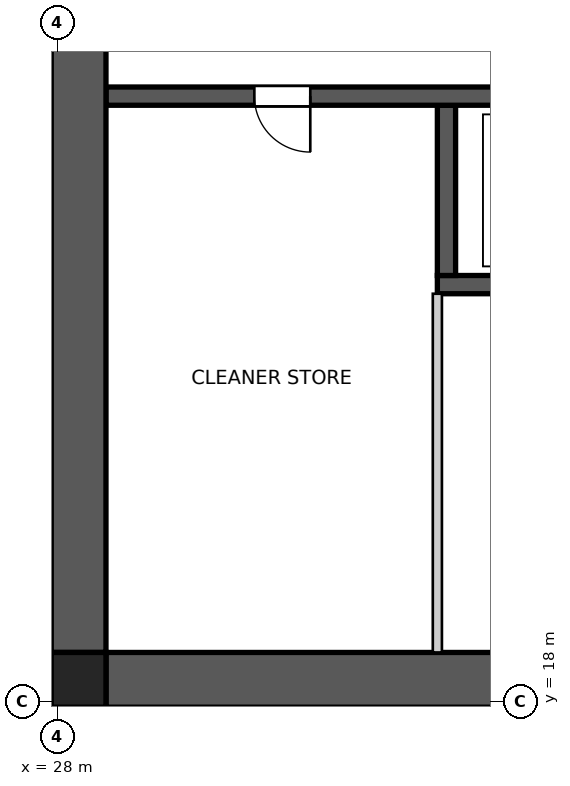
"""IFC4 building model, lengths in metres.
Left out: names, types, materials, properties, quantities, classifications, styles, units other than length and angle.
Written with IfcOpenShell. Run it as: python <this file> out.ifc"""

import sys

from ifc_helpers import new_model, si_unit, direction, frame, frame_2d, origin, origin_2d, place, context, subcontext, project, spatial, polyline, rectangle, outline, extrude, element, fill, save


model = new_model("IFC4")
c1 = context("Model", 3, precision=1e-05, world=origin(), true_north=direction((0.0, 1.0)))
c2 = subcontext(c1, "Body", "Model", "MODEL_VIEW")
j1 = project(units=[si_unit("LENGTHUNIT", "METRE"), si_unit("PLANEANGLEUNIT", "RADIAN")], contexts=[c1])
p1 = place(None, origin())
s1 = spatial("IfcSite", under=j1, at=p1, CompositionType="ELEMENT")
p2 = place(p1, origin())
s2 = spatial("IfcBuilding", under=s1, at=p2, CompositionType="ELEMENT")
p3 = place(p2, frame((0.0, 0.0, 47.2)))
s3 = spatial("IfcBuildingStorey", under=s2, at=p3, CompositionType="ELEMENT", Elevation=47.2)
p4 = place(p3, frame((51.2, 18.35, 0.0), z_axis=(0.0, 0.0, 1.0), x_axis=(-1.0, 0.0, 0.0)))
e1 = element("IfcWall", 1, at=p4, inside=s3, PredefinedType="SHEAR", context=c2, shape_type="SweptSolid", body=[
    extrude(outline(polyline([(0.0, -0.45), (22.4, -0.45), (22.4, -0.025), (22.85, -0.025), (22.85, 0.025), (22.4, 0.025), (22.4, 0.45), (0.0, 0.45), (0.0, 0.025), (-0.45, 0.025), (-0.45, -0.025), (0.0, -0.025), (0.0, -0.45)])), origin(), (0.0, 0.0, 1.0), 3.4),
])
p5 = place(p3, frame((28.35, 41.2, 0.0), z_axis=(0.0, 0.0, 1.0), x_axis=(0.0, -1.0, 0.0)))
e2 = element("IfcWall", 2, at=p5, inside=s3, PredefinedType="SHEAR", context=c2, shape_type="SweptSolid", body=[
    extrude(outline(polyline([(0.0, -0.45), (22.4, -0.45), (22.4, -0.025), (22.85, -0.025), (22.85, 0.025), (22.4, 0.025), (22.4, 0.45), (0.0, 0.45), (0.0, 0.025), (-0.45, 0.025), (-0.45, -0.025), (0.0, -0.025), (0.0, -0.45)])), origin(), (0.0, 0.0, 1.0), 3.4),
])
p6 = place(p5, frame((11.14, 0.0, 0.0)))
e3 = element("IfcOpeningElement", 3, at=p6, cuts=e2, PredefinedType="OPENING", context=c2, shape_type="SweptSolid", body=[
    extrude(rectangle(XDim=1.02, YDim=2.4, at=frame_2d((0.51, 1.2))), frame((0.0, 0.46, 0.0), z_axis=(0.0, -1.0, 0.0), x_axis=(1.0, 0.0, 0.0)), (0.0, 0.0, 1.0), 0.92),
])
p7 = place(p3, frame((51.2, 27.95, 0.0), z_axis=(0.0, 0.0, 1.0), x_axis=(-1.0, 0.0, 0.0)))
e4 = element("IfcWall", 4, at=p7, inside=s3, PredefinedType="SHEAR", context=c2, shape_type="SweptSolid", body=[
    extrude(rectangle(XDim=22.4, YDim=0.3, at=frame_2d((11.2, 0.0))), origin(), (0.0, 0.0, 1.0), 3.4),
])
p8 = place(p7, frame((19.04, 0.0, 0.0)))
e5 = element("IfcOpeningElement", 5, at=p8, cuts=e4, PredefinedType="OPENING", context=c2, shape_type="SweptSolid", body=[
    extrude(rectangle(XDim=0.92, YDim=2.1, at=frame_2d((0.46, 1.05))), frame((0.0, 0.16, 0.0), z_axis=(0.0, -1.0, 0.0), x_axis=(1.0, 0.0, 0.0)), (0.0, 0.0, 1.0), 0.32),
])
p9 = place(p7, frame((1.265, 0.0, 0.0)))
e6 = element("IfcOpeningElement", 6, at=p9, cuts=e4, PredefinedType="OPENING", context=c2, shape_type="SweptSolid", body=[
    extrude(rectangle(XDim=1.02, YDim=2.1, at=frame_2d((0.51, 1.05))), frame((0.0, 0.16, 0.0), z_axis=(0.0, -1.0, 0.0), x_axis=(1.0, 0.0, 0.0)), (0.0, 0.0, 1.0), 0.32),
])
p10 = place(p7, frame((4.015, 0.0, 0.0)))
e7 = element("IfcOpeningElement", 7, at=p10, cuts=e4, PredefinedType="OPENING", context=c2, shape_type="SweptSolid", body=[
    extrude(rectangle(XDim=0.92, YDim=2.1, at=frame_2d((0.46, 1.05))), frame((0.0, 0.16, 0.0), z_axis=(0.0, -1.0, 0.0), x_axis=(1.0, 0.0, 0.0)), (0.0, 0.0, 1.0), 0.32),
])
p11 = place(p7, frame((14.85, 0.0, 0.0)))
e8 = element("IfcOpeningElement", 8, at=p11, cuts=e4, PredefinedType="OPENING", context=c2, shape_type="SweptSolid", body=[
    extrude(rectangle(XDim=1.1, YDim=2.1, at=frame_2d((0.55, 1.05))), frame((0.0, 0.16, 0.0), z_axis=(0.0, -1.0, 0.0), x_axis=(1.0, 0.0, 0.0)), (0.0, 0.0, 1.0), 0.32),
])
p12 = place(p3, frame((45.75, 24.85, 0.0), z_axis=(0.0, 0.0, 1.0), x_axis=(-1.0, 0.0, 0.0)))
e9 = element("IfcWall", 9, at=p12, inside=s3, PredefinedType="SHEAR", context=c2, shape_type="SweptSolid", body=[
    extrude(rectangle(XDim=11.5, YDim=0.3, at=frame_2d((5.75, 0.0))), origin(), (0.0, 0.0, 1.0), 3.4),
])
p13 = place(p3, frame((34.4, 27.8, 0.0), z_axis=(0.0, 0.0, 1.0), x_axis=(0.0, -1.0, 0.0)))
e10 = element("IfcWall", 10, at=p13, inside=s3, PredefinedType="SHEAR", context=c2, shape_type="SweptSolid", body=[
    extrude(rectangle(XDim=2.8, YDim=0.3, at=frame_2d((1.4, 0.0))), origin(), (0.0, 0.0, 1.0), 3.4),
])
p14 = place(p3, frame((28.35, 18.35, 0.0), z_axis=(0.0, 0.0, 1.0), x_axis=(1.0, 0.0, 0.0)))
e11 = element("IfcColumn", 11, at=p14, inside=s3, PredefinedType="COLUMN", context=c2, shape_type="SweptSolid", body=[
    extrude(rectangle(XDim=0.9, YDim=0.9, at=origin_2d()), origin(), (0.0, 0.0, 1.0), 3.4),
])
p15 = place(p3, frame((34.25, 18.8, 0.0), z_axis=(0.0, 0.0, 1.0), x_axis=(0.0, 1.0, 0.0)))
e12 = element("IfcWall", 12, at=p15, inside=s3, PredefinedType="SOLIDWALL", context=c2, shape_type="SweptSolid", body=[
    extrude(rectangle(XDim=5.9, YDim=0.15, at=frame_2d((2.95, 0.0))), origin(), (0.0, 0.0, 1.0), 3.25),
])
p16 = place(p8, origin())
e13 = element("IfcDoor", 13, at=p16, inside=s3, OperationType="SINGLE_SWING_LEFT", PredefinedType="DOOR", context=c2, shape_type="SweptSolid", body=[
    extrude(rectangle(XDim=0.92, YDim=2.1, at=frame_2d((0.46, 1.05))), frame((0.0, 0.025, 0.0), z_axis=(0.0, -1.0, 0.0), x_axis=(1.0, 0.0, 0.0)), (0.0, 0.0, 1.0), 0.05),
])
fill(e5, e13)
save(model, sys.argv[1])
